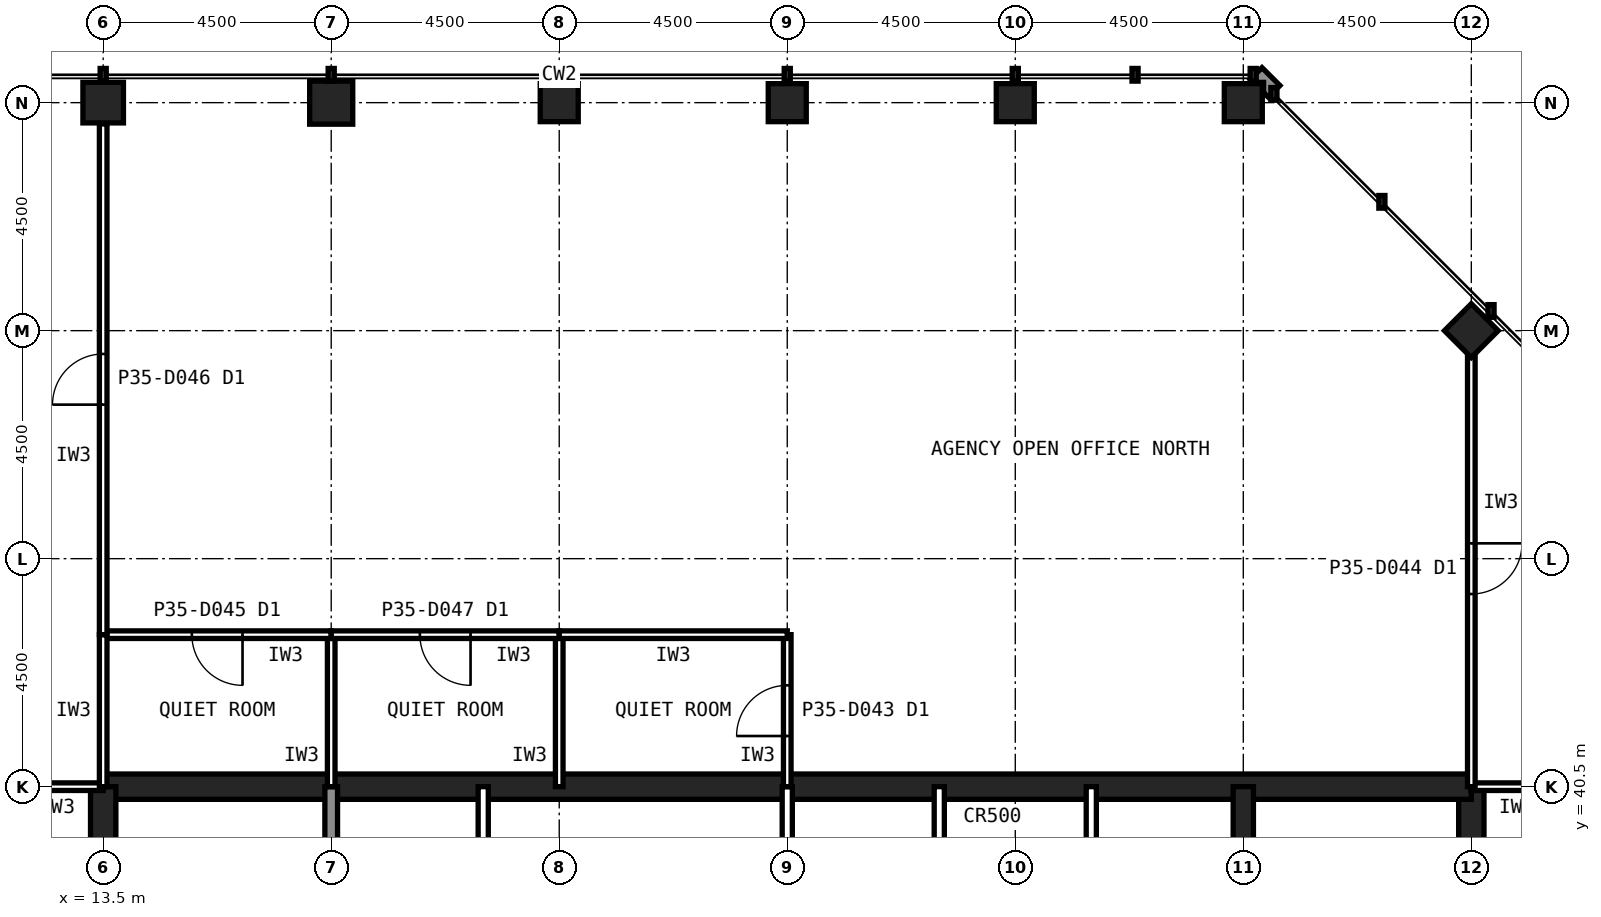
"""IFC4 building model, lengths in metres.
Left out: names, types, materials, properties, quantities, classifications, styles, units other than length and angle.
Written with IfcOpenShell. Run it as: python <this file> out.ifc"""

import sys

from ifc_helpers import new_model, si_unit, direction, frame, frame_2d, origin, origin_2d, place, context, subcontext, project, spatial, rectangle, hollow_rectangle, extrude, element, fill, save


model = new_model("IFC4")
c1 = context("Model", 3, precision=1e-05, world=origin(), true_north=direction((0.0, 1.0)))
c2 = subcontext(c1, "Body", "Model", "MODEL_VIEW")
j1 = project(units=[si_unit("LENGTHUNIT", "METRE"), si_unit("PLANEANGLEUNIT", "RADIAN")], contexts=[c1])
p1 = place(None, origin())
s1 = spatial("IfcSite", under=j1, at=p1, CompositionType="ELEMENT")
p2 = place(p1, origin())
s2 = spatial("IfcBuilding", under=s1, at=p2, CompositionType="ELEMENT")
p3 = place(p2, frame((0.0, 0.0, 151.6)))
s3 = spatial("IfcBuildingStorey", under=s2, at=p3, CompositionType="ELEMENT", Elevation=151.6)
for number, where, z_axis, x_axis in (
    (1, (36.0, 54.0, 0.0), (0.0, 0.0, 1.0), (1.0, 0.0, 0.0)),
    (2, (31.5, 54.0, 0.0), (0.0, 0.0, 1.0), (1.0, 0.0, 0.0)),
    (3, (27.0, 54.0, 0.0), (0.0, 0.0, 1.0), (1.0, 0.0, 0.0)),
    (4, (22.5, 54.0, 0.0), (0.0, 0.0, 1.0), (1.0, 0.0, 0.0)),
):
    element("IfcColumn", number, at=place(p3, frame(where, z_axis=z_axis, x_axis=x_axis)), inside=s3, PredefinedType="COLUMN", context=c2, shape_type="SweptSolid", body=[
        extrude(hollow_rectangle(XDim=0.75, YDim=0.75, WallThickness=0.04, at=origin_2d()), origin(), (0.0, 0.0, 1.0), 4.0),
    ])
p4 = place(p3, frame((18.0, 54.0, 0.0), z_axis=(0.0, 0.0, 1.0), x_axis=(1.0, 0.0, 0.0)))
e5 = element("IfcColumn", 5, at=p4, inside=s3, PredefinedType="COLUMN", context=c2, shape_type="SweptSolid", body=[
    extrude(hollow_rectangle(XDim=0.85, YDim=0.85, WallThickness=0.05, at=origin_2d()), origin(), (0.0, 0.0, 1.0), 4.0),
])
p5 = place(p3, frame((13.5, 54.0, 0.0), z_axis=(0.0, 0.0, 1.0), x_axis=(1.0, 0.0, 0.0)))
e6 = element("IfcColumn", 6, at=p5, inside=s3, PredefinedType="COLUMN", context=c2, shape_type="SweptSolid", body=[
    extrude(hollow_rectangle(XDim=0.8, YDim=0.8, WallThickness=0.045, at=origin_2d()), origin(), (0.0, 0.0, 1.0), 4.0),
])
p6 = place(p3, frame((40.5, 49.5, 0.0), z_axis=(0.0, 0.0, 1.0), x_axis=(0.707106781187, 0.707106781187, 0.0)))
e7 = element("IfcColumn", 7, at=p6, inside=s3, PredefinedType="COLUMN", context=c2, shape_type="SweptSolid", body=[
    extrude(hollow_rectangle(XDim=0.75, YDim=0.75, WallThickness=0.04, at=origin_2d()), origin(), (0.0, 0.0, 1.0), 4.0),
])
p7 = place(p3, frame((40.5, 13.5, 0.0), z_axis=(0.0, 0.0, 1.0), x_axis=(0.0, 1.0, 0.0)))
e8 = element("IfcWall", 8, at=p7, inside=s3, PredefinedType="SHEAR", context=c2, shape_type="SweptSolid", body=[
    extrude(rectangle(XDim=27.0, YDim=0.5, at=frame_2d((13.5, 0.0))), origin(), (0.0, 0.0, 1.0), 4.0),
])
p8 = place(p7, frame((5.85, 0.0, 0.0)))
e9 = element("IfcOpeningElement", 9, at=p8, cuts=e8, PredefinedType="OPENING", context=c2, shape_type="SweptSolid", body=[
    extrude(rectangle(XDim=1.8, YDim=2.1, at=frame_2d((0.9, 1.05))), frame((0.0, 0.26, 0.0), z_axis=(0.0, -1.0, 0.0), x_axis=(1.0, 0.0, 0.0)), (0.0, 0.0, 1.0), 0.52),
])
p9 = place(p7, frame((19.65, 0.0, 0.0)))
e10 = element("IfcOpeningElement", 10, at=p9, cuts=e8, PredefinedType="OPENING", context=c2, shape_type="SweptSolid", body=[
    extrude(rectangle(XDim=1.2, YDim=2.1, at=frame_2d((0.6, 1.05))), frame((0.0, 0.26, 0.0), z_axis=(0.0, -1.0, 0.0), x_axis=(1.0, 0.0, 0.0)), (0.0, 0.0, 1.0), 0.52),
])
p10 = place(p3, frame((40.5, 40.5, 0.0), z_axis=(0.0, 0.0, 1.0), x_axis=(-1.0, 0.0, 0.0)))
e11 = element("IfcWall", 11, at=p10, inside=s3, PredefinedType="SHEAR", context=c2, shape_type="SweptSolid", body=[
    extrude(rectangle(XDim=27.0, YDim=0.5, at=frame_2d((13.5, 0.0))), origin(), (0.0, 0.0, 1.0), 4.0),
])
p11 = place(p3, frame((13.5, 40.5, 0.0), z_axis=(0.0, 0.0, 1.0), x_axis=(0.0, -1.0, 0.0)))
e12 = element("IfcWall", 12, at=p11, inside=s3, PredefinedType="SHEAR", context=c2, shape_type="SweptSolid", body=[
    extrude(rectangle(XDim=27.0, YDim=0.5, at=frame_2d((13.5, 0.0))), origin(), (0.0, 0.0, 1.0), 4.0),
])
p12 = place(p11, frame((19.65, 0.0, 0.0)))
e13 = element("IfcOpeningElement", 13, at=p12, cuts=e12, PredefinedType="OPENING", context=c2, shape_type="SweptSolid", body=[
    extrude(rectangle(XDim=1.2, YDim=2.1, at=frame_2d((0.6, 1.05))), frame((0.0, 0.26, 0.0), z_axis=(0.0, -1.0, 0.0), x_axis=(1.0, 0.0, 0.0)), (0.0, 0.0, 1.0), 0.52),
])
p13 = place(p11, frame((5.85, 0.0, 0.0)))
e14 = element("IfcOpeningElement", 14, at=p13, cuts=e12, PredefinedType="OPENING", context=c2, shape_type="SweptSolid", body=[
    extrude(rectangle(XDim=1.8, YDim=2.1, at=frame_2d((0.9, 1.05))), frame((0.0, 0.26, 0.0), z_axis=(0.0, -1.0, 0.0), x_axis=(1.0, 0.0, 0.0)), (0.0, 0.0, 1.0), 0.52),
])
p14 = place(p3, frame((18.0, 36.0, 0.0), z_axis=(0.0, 0.0, 1.0), x_axis=(0.0, 1.0, 0.0)))
e15 = element("IfcWall", 15, at=p14, inside=s3, PredefinedType="SOLIDWALL", context=c2, shape_type="SweptSolid", body=[
    extrude(rectangle(XDim=4.5, YDim=0.25, at=frame_2d((2.25, 0.0))), origin(), (0.0, 0.0, 1.0), 3.84),
])
p15 = place(p3, frame((36.0, 22.5, 0.0), z_axis=(0.0, 0.0, 1.0), x_axis=(0.0, 1.0, 0.0)))
e16 = element("IfcWall", 16, at=p15, inside=s3, PredefinedType="SHEAR", context=c2, shape_type="SweptSolid", body=[
    extrude(rectangle(XDim=18.0, YDim=0.4, at=frame_2d((9.0, 0.0))), origin(), (0.0, 0.0, 1.0), 4.0),
])
for number, where, z_axis, x_axis in (
    (17, (21.0, 36.0, 0.0), (0.0, 0.0, 1.0), (0.0, 1.0, 0.0)),
    (18, (27.0, 36.0, 0.0), (0.0, 0.0, 1.0), (0.0, 1.0, 0.0)),
    (19, (30.0, 36.0, 0.0), (0.0, 0.0, 1.0), (0.0, 1.0, 0.0)),
    (20, (33.0, 36.0, 0.0), (0.0, 0.0, 1.0), (0.0, 1.0, 0.0)),
):
    element("IfcWall", number, at=place(p3, frame(where, z_axis=z_axis, x_axis=x_axis)), inside=s3, PredefinedType="PARTITIONING", context=c2, shape_type="SweptSolid", body=[
        extrude(rectangle(XDim=4.5, YDim=0.2, at=frame_2d((2.25, 0.0))), origin(), (0.0, 0.0, 1.0), 3.84),
    ])
p16 = place(p3, frame((42.3, 40.5, 0.0), z_axis=(0.0, 0.0, 1.0), x_axis=(-1.0, 0.0, 0.0)))
e21 = element("IfcWall", 21, at=p16, inside=s3, PredefinedType="PARTITIONING", context=c2, shape_type="SweptSolid", body=[
    extrude(rectangle(XDim=1.81, YDim=0.15, at=frame_2d((0.905, 0.0))), origin(), (0.0, 0.0, 1.0), 2.989),
])
p17 = place(p3, frame((13.5, 40.5, 0.0), z_axis=(0.0, 0.0, 1.0), x_axis=(-1.0, 0.0, 0.0)))
e22 = element("IfcWall", 22, at=p17, inside=s3, PredefinedType="PARTITIONING", context=c2, shape_type="SweptSolid", body=[
    extrude(rectangle(XDim=1.8, YDim=0.15, at=frame_2d((0.9, 0.0))), origin(), (0.0, 0.0, 1.0), 2.989),
])
p18 = place(p3, frame((18.0, 40.5, 0.0), z_axis=(0.0, 0.0, 1.0), x_axis=(0.0, 1.0, 0.0)))
e23 = element("IfcWall", 23, at=p18, inside=s3, PredefinedType="PARTITIONING", context=c2, shape_type="SweptSolid", body=[
    extrude(rectangle(XDim=3.0, YDim=0.15, at=frame_2d((1.5, 0.0))), origin(), (0.0, 0.0, 1.0), 2.989),
])
p19 = place(p3, frame((18.0, 43.5, 0.0), z_axis=(0.0, 0.0, 1.0), x_axis=(-1.0, 0.0, 0.0)))
e24 = element("IfcWall", 24, at=p19, inside=s3, PredefinedType="PARTITIONING", context=c2, shape_type="SweptSolid", body=[
    extrude(rectangle(XDim=4.5, YDim=0.15, at=frame_2d((2.25, 0.0))), origin(), (0.0, 0.0, 1.0), 3.84),
])
p20 = place(p19, frame((1.75, 0.0, 0.0)))
e25 = element("IfcOpeningElement", 25, at=p20, cuts=e24, PredefinedType="OPENING", context=c2, shape_type="SweptSolid", body=[
    extrude(rectangle(XDim=1.0, YDim=2.1, at=frame_2d((0.5, 1.05))), frame((0.0, 0.085, 0.0), z_axis=(0.0, -1.0, 0.0), x_axis=(1.0, 0.0, 0.0)), (0.0, 0.0, 1.0), 0.17),
])
for number, where, z_axis, x_axis in (
    (26, (13.5, 43.5, 0.0), (0.0, 0.0, 1.0), (0.0, -1.0, 0.0)),
    (27, (22.5, 40.5, 0.0), (0.0, 0.0, 1.0), (0.0, 1.0, 0.0)),
):
    element("IfcWall", number, at=place(p3, frame(where, z_axis=z_axis, x_axis=x_axis)), inside=s3, PredefinedType="PARTITIONING", context=c2, shape_type="SweptSolid", body=[
        extrude(rectangle(XDim=3.0, YDim=0.15, at=frame_2d((1.5, 0.0))), origin(), (0.0, 0.0, 1.0), 2.989),
    ])
p21 = place(p3, frame((22.5, 43.5, 0.0), z_axis=(0.0, 0.0, 1.0), x_axis=(-1.0, 0.0, 0.0)))
e28 = element("IfcWall", 28, at=p21, inside=s3, PredefinedType="PARTITIONING", context=c2, shape_type="SweptSolid", body=[
    extrude(rectangle(XDim=4.5, YDim=0.15, at=frame_2d((2.25, 0.0))), origin(), (0.0, 0.0, 1.0), 3.84),
])
p22 = place(p21, frame((1.75, 0.0, 0.0)))
e29 = element("IfcOpeningElement", 29, at=p22, cuts=e28, PredefinedType="OPENING", context=c2, shape_type="SweptSolid", body=[
    extrude(rectangle(XDim=1.0, YDim=2.1, at=frame_2d((0.5, 1.05))), frame((0.0, 0.085, 0.0), z_axis=(0.0, -1.0, 0.0), x_axis=(1.0, 0.0, 0.0)), (0.0, 0.0, 1.0), 0.17),
])
p23 = place(p3, frame((27.0, 40.5, 0.0), z_axis=(0.0, 0.0, 1.0), x_axis=(0.0, 1.0, 0.0)))
e30 = element("IfcWall", 30, at=p23, inside=s3, PredefinedType="PARTITIONING", context=c2, shape_type="SweptSolid", body=[
    extrude(rectangle(XDim=3.0, YDim=0.15, at=frame_2d((1.5, 0.0))), origin(), (0.0, 0.0, 1.0), 2.989),
])
p24 = place(p23, frame((1.0, 0.0, 0.0)))
e31 = element("IfcOpeningElement", 31, at=p24, cuts=e30, PredefinedType="OPENING", context=c2, shape_type="SweptSolid", body=[
    extrude(rectangle(XDim=1.0, YDim=2.1, at=frame_2d((0.5, 1.05))), frame((0.0, 0.085, 0.0), z_axis=(0.0, -1.0, 0.0), x_axis=(1.0, 0.0, 0.0)), (0.0, 0.0, 1.0), 0.17),
])
p25 = place(p3, frame((27.0, 43.5, 0.0), z_axis=(0.0, 0.0, 1.0), x_axis=(-1.0, 0.0, 0.0)))
e32 = element("IfcWall", 32, at=p25, inside=s3, PredefinedType="PARTITIONING", context=c2, shape_type="SweptSolid", body=[
    extrude(rectangle(XDim=4.5, YDim=0.15, at=frame_2d((2.25, 0.0))), origin(), (0.0, 0.0, 1.0), 3.84),
])
p26 = place(p3, frame((13.5, 43.5, 0.0), z_axis=(0.0, 0.0, 1.0), x_axis=(0.0, 1.0, 0.0)))
e33 = element("IfcWall", 33, at=p26, inside=s3, PredefinedType="PARTITIONING", context=c2, shape_type="SweptSolid", body=[
    extrude(rectangle(XDim=10.08, YDim=0.15, at=frame_2d((5.04, 0.0))), origin(), (0.0, 0.0, 1.0), 2.989),
])
p27 = place(p26, frame((4.54, 0.0, 0.0)))
e34 = element("IfcOpeningElement", 34, at=p27, cuts=e33, PredefinedType="OPENING", context=c2, shape_type="SweptSolid", body=[
    extrude(rectangle(XDim=1.0, YDim=2.1, at=frame_2d((0.5, 1.05))), frame((0.0, 0.085, 0.0), z_axis=(0.0, -1.0, 0.0), x_axis=(1.0, 0.0, 0.0)), (0.0, 0.0, 1.0), 0.17),
])
p28 = place(p3, frame((40.5, 49.105, 0.0), z_axis=(0.0, 0.0, 1.0), x_axis=(0.0, -1.0, 0.0)))
e35 = element("IfcWall", 35, at=p28, inside=s3, PredefinedType="PARTITIONING", context=c2, shape_type="SweptSolid", body=[
    extrude(rectangle(XDim=8.605, YDim=0.15, at=frame_2d((4.302, 0.0))), origin(), (0.0, 0.0, 1.0), 2.989),
])
p29 = place(p28, frame((3.802, 0.0, 0.0)))
e36 = element("IfcOpeningElement", 36, at=p29, cuts=e35, PredefinedType="OPENING", context=c2, shape_type="SweptSolid", body=[
    extrude(rectangle(XDim=1.0, YDim=2.1, at=frame_2d((0.5, 1.05))), frame((0.0, 0.085, 0.0), z_axis=(0.0, -1.0, 0.0), x_axis=(1.0, 0.0, 0.0)), (0.0, 0.0, 1.0), 0.17),
])
p30 = place(p20, origin())
e37 = element("IfcDoor", 37, at=p30, inside=s3, OperationType="SINGLE_SWING_LEFT", PredefinedType="DOOR", context=c2, shape_type="SweptSolid", body=[
    extrude(rectangle(XDim=1.0, YDim=2.1, at=frame_2d((0.5, 1.05))), frame((0.0, 0.025, 0.0), z_axis=(0.0, -1.0, 0.0), x_axis=(1.0, 0.0, 0.0)), (0.0, 0.0, 1.0), 0.05),
])
fill(e25, e37)
p31 = place(p22, origin())
e38 = element("IfcDoor", 38, at=p31, inside=s3, OperationType="SINGLE_SWING_LEFT", PredefinedType="DOOR", context=c2, shape_type="SweptSolid", body=[
    extrude(rectangle(XDim=1.0, YDim=2.1, at=frame_2d((0.5, 1.05))), frame((0.0, 0.025, 0.0), z_axis=(0.0, -1.0, 0.0), x_axis=(1.0, 0.0, 0.0)), (0.0, 0.0, 1.0), 0.05),
])
fill(e29, e38)
p32 = place(p24, origin())
e39 = element("IfcDoor", 39, at=p32, inside=s3, OperationType="SINGLE_SWING_LEFT", PredefinedType="DOOR", context=c2, shape_type="SweptSolid", body=[
    extrude(rectangle(XDim=1.0, YDim=2.1, at=frame_2d((0.5, 1.05))), frame((0.0, 0.025, 0.0), z_axis=(0.0, -1.0, 0.0), x_axis=(1.0, 0.0, 0.0)), (0.0, 0.0, 1.0), 0.05),
])
fill(e31, e39)
p33 = place(p27, origin())
e40 = element("IfcDoor", 40, at=p33, inside=s3, OperationType="SINGLE_SWING_LEFT", PredefinedType="DOOR", context=c2, shape_type="SweptSolid", body=[
    extrude(rectangle(XDim=1.0, YDim=2.1, at=frame_2d((0.5, 1.05))), frame((0.0, 0.025, 0.0), z_axis=(0.0, -1.0, 0.0), x_axis=(1.0, 0.0, 0.0)), (0.0, 0.0, 1.0), 0.05),
])
fill(e34, e40)
p34 = place(p29, origin())
e41 = element("IfcDoor", 41, at=p34, inside=s3, OperationType="SINGLE_SWING_LEFT", PredefinedType="DOOR", context=c2, shape_type="SweptSolid", body=[
    extrude(rectangle(XDim=1.0, YDim=2.1, at=frame_2d((0.5, 1.05))), frame((0.0, 0.025, 0.0), z_axis=(0.0, -1.0, 0.0), x_axis=(1.0, 0.0, 0.0)), (0.0, 0.0, 1.0), 0.05),
])
fill(e36, e41)
save(model, sys.argv[1])
